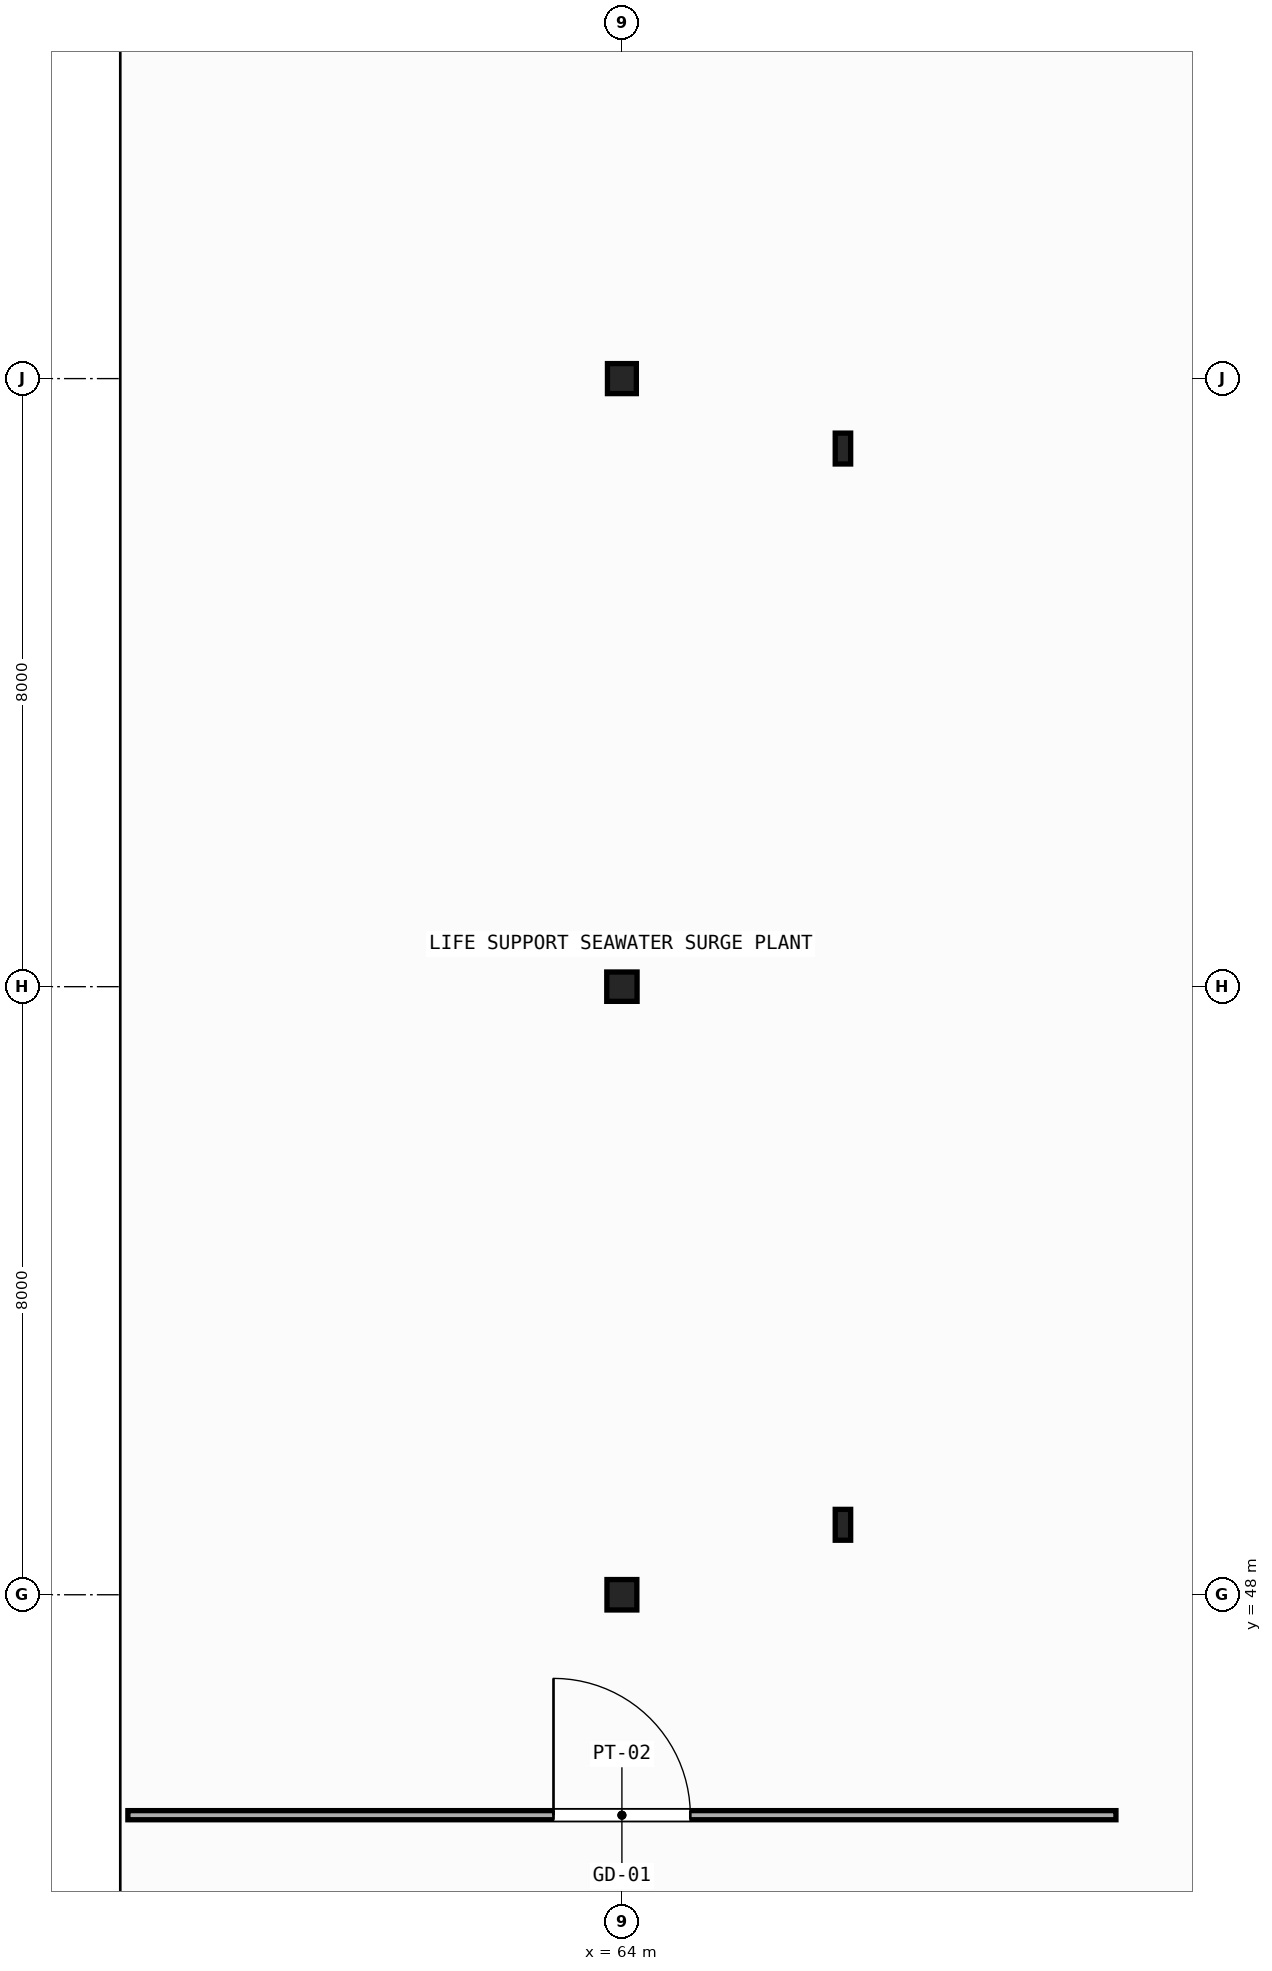
"""IFC4 building model, lengths in metres.
Left out: names, types, materials, properties, quantities, classifications, styles, units other than length and angle.
Written with IfcOpenShell. Run it as: python <this file> out.ifc"""

import sys

from ifc_helpers import new_model, si_unit, direction, frame, frame_2d, origin, origin_2d, place, context, subcontext, project, spatial, rectangle, hollow_rectangle, i_section, extrude, element, fill, save


model = new_model("IFC4")
c1 = context("Model", 3, precision=1e-05, world=origin(), true_north=direction((0.0, 1.0)))
c2 = subcontext(c1, "Body", "Model", "MODEL_VIEW")
j1 = project(units=[si_unit("LENGTHUNIT", "METRE"), si_unit("PLANEANGLEUNIT", "RADIAN")], contexts=[c1])
p1 = place(None, origin())
s1 = spatial("IfcSite", under=j1, at=p1, CompositionType="ELEMENT")
p2 = place(p1, origin())
s2 = spatial("IfcBuilding", under=s1, at=p2, CompositionType="ELEMENT")
p3 = place(p2, frame((0.0, 0.0, -5.4)))
s3 = spatial("IfcBuildingStorey", under=s2, at=p3, CompositionType="ELEMENT", Elevation=-5.4)
p4 = place(p3, frame((64.0, 48.0, 0.0), z_axis=(0.0, 0.0, 1.0), x_axis=(0.0, 1.0, 0.0)))
e1 = element("IfcColumn", 1, at=p4, inside=s3, PredefinedType="COLUMN", context=c2, shape_type="SweptSolid", body=[
    extrude(i_section(OverallWidth=0.4, OverallDepth=0.393, WebThickness=0.023, FlangeThickness=0.037, FilletRadius=0.015, at=origin_2d()), origin(), (0.0, 0.0, 1.0), 5.04),
])
p5 = place(p3, frame((64.0, 56.0, 0.0), z_axis=(0.0, 0.0, 1.0), x_axis=(1.0, 0.0, 0.0)))
e2 = element("IfcColumn", 2, at=p5, inside=s3, PredefinedType="COLUMN", context=c2, shape_type="SweptSolid", body=[
    extrude(i_section(OverallWidth=0.399, OverallDepth=0.386, WebThickness=0.021, FlangeThickness=0.033, FilletRadius=0.015, at=origin_2d()), origin(), (0.0, 0.0, 1.0), 5.04),
])
p6 = place(p3, frame((64.0, 64.0, 0.0), z_axis=(0.0, 0.0, 1.0), x_axis=(0.0, 1.0, 0.0)))
e3 = element("IfcColumn", 3, at=p6, inside=s3, PredefinedType="COLUMN", context=c2, shape_type="SweptSolid", body=[
    extrude(i_section(OverallWidth=0.395, OverallDepth=0.38, WebThickness=0.019, FlangeThickness=0.03, FilletRadius=0.015, at=origin_2d()), origin(), (0.0, 0.0, 1.0), 5.04),
])
for number, where, z_axis, x_axis in (
    (4, (66.908, 63.08, 0.0), (0.0, 0.0, 1.0), (1.0, 0.0, 0.0)),
    (5, (66.908, 48.92, 0.0), (0.0, 0.0, 1.0), (1.0, 0.0, 0.0)),
):
    element("IfcColumn", number, at=place(p3, frame(where, z_axis=z_axis, x_axis=x_axis)), inside=s3, PredefinedType="COLUMN", context=c2, shape_type="SweptSolid", body=[
        extrude(hollow_rectangle(XDim=0.203, YDim=0.406, WallThickness=0.012, InnerFilletRadius=0.012, OuterFilletRadius=0.024, at=origin_2d()), origin(), (0.0, 0.0, 1.0), 5.02),
    ])
p7 = place(p3, frame((57.5, 45.1, 0.0), z_axis=(0.0, 0.0, 1.0), x_axis=(1.0, 0.0, 0.0)))
e6 = element("IfcWall", 6, at=p7, inside=s3, PredefinedType="PARTITIONING", context=c2, shape_type="SweptSolid", body=[
    extrude(rectangle(XDim=13.0, YDim=0.12, at=frame_2d((6.5, 0.0))), origin(), (0.0, 0.0, 1.0), 4.29),
])
p8 = place(p7, frame((5.6, 0.0, 0.0)))
e7 = element("IfcOpeningElement", 7, at=p8, cuts=e6, PredefinedType="OPENING", context=c2, shape_type="SweptSolid", body=[
    extrude(rectangle(XDim=1.8, YDim=2.4, at=frame_2d((0.9, 1.2))), frame((0.0, 0.07, 0.0), z_axis=(0.0, -1.0, 0.0), x_axis=(1.0, 0.0, 0.0)), (0.0, 0.0, 1.0), 0.14),
])
p9 = place(p8, origin())
e8 = element("IfcDoor", 8, at=p9, inside=s3, OperationType="SINGLE_SWING_LEFT", PredefinedType="DOOR", context=c2, shape_type="SweptSolid", body=[
    extrude(rectangle(XDim=1.8, YDim=2.4, at=frame_2d((0.9, 1.2))), frame((0.0, 0.025, 0.0), z_axis=(0.0, -1.0, 0.0), x_axis=(1.0, 0.0, 0.0)), (0.0, 0.0, 1.0), 0.05),
])
fill(e7, e8)
save(model, sys.argv[1])
